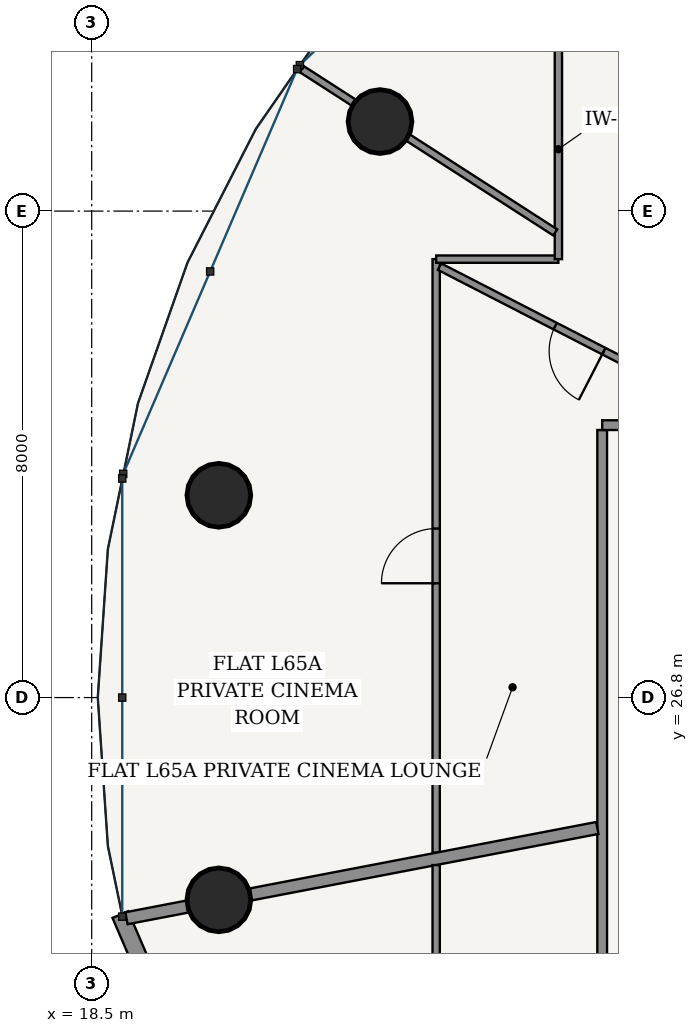
"""IFC4 building model, lengths in metres.
Left out: names, types, materials, properties, quantities, classifications, styles, units other than length and angle.
Written with IfcOpenShell. Run it as: python <this file> out.ifc"""

import sys

from ifc_helpers import new_model, si_unit, direction, frame, frame_2d, origin, origin_2d, place, context, subcontext, project, spatial, rectangle, hollow_circle, extrude, source, transform, mapped, element, fill, save


model = new_model("IFC4")
c1 = context("Model", 3, precision=1e-05, world=origin(), true_north=direction((-0.2419218956, 0.970295726276)))
c2 = subcontext(c1, "Body", "Model", "MODEL_VIEW")
j1 = project(units=[si_unit("LENGTHUNIT", "METRE"), si_unit("PLANEANGLEUNIT", "RADIAN")], contexts=[c1])
p1 = place(None, origin())
s1 = spatial("IfcSite", under=j1, at=p1, CompositionType="ELEMENT")
p2 = place(p1, origin())
s2 = spatial("IfcBuilding", under=s1, at=p2, CompositionType="ELEMENT")
p3 = place(p2, frame((0.0, 0.0, 248.2)))
s3 = spatial("IfcBuildingStorey", under=s2, at=p3, CompositionType="ELEMENT", Elevation=248.2)
for number, where, z_axis, x_axis in (
    (1, (23.241, 36.272, 0.0), (0.0, 0.0, 1.0), (1.0, 0.0, 0.0)),
    (2, (20.591, 30.126, 0.0), (0.0, 0.0, 1.0), (1.0, 0.0, 0.0)),
    (3, (20.591, 23.474, 0.0), (0.0, 0.0, 1.0), (1.0, 0.0, 0.0)),
):
    element("IfcColumn", number, at=place(p3, frame(where, z_axis=z_axis, x_axis=x_axis)), inside=s3, PredefinedType="COLUMN", context=c2, shape_type="SweptSolid", body=[
        extrude(hollow_circle(Radius=0.525, WallThickness=0.035, at=origin_2d()), origin(), (0.0, 0.0, 1.0), 3.75),
    ])
p4 = place(p3, frame((18.971, 23.231, 0.0), z_axis=(0.0, 0.0, 1.0), x_axis=(0.394816612978, -0.918759948037, 0.0)))
e4 = element("IfcWall", 4, at=p4, inside=s3, PredefinedType="SOLIDWALL", context=c2, shape_type="SweptSolid", body=[
    extrude(rectangle(XDim=7.485, YDim=0.28, at=frame_2d((3.743, 0.0))), origin(), (0.0, 0.0, 1.0), 3.49),
])
p5 = place(p4, frame((1.246, 0.0, 0.85)))
e5 = element("IfcOpeningElement", 5, at=p5, cuts=e4, PredefinedType="OPENING", context=c2, shape_type="SweptSolid", body=[
    extrude(rectangle(XDim=1.55, YDim=1.95, at=frame_2d((0.775, 0.975))), frame((0.0, 0.15, 0.0), z_axis=(0.0, -1.0, 0.0), x_axis=(1.0, 0.0, 0.0)), (0.0, 0.0, 1.0), 0.3),
])
p6 = place(p4, frame((4.689, 0.0, 0.85)))
e6 = element("IfcOpeningElement", 6, at=p6, cuts=e4, PredefinedType="OPENING", context=c2, shape_type="SweptSolid", body=[
    extrude(rectangle(XDim=1.55, YDim=1.95, at=frame_2d((0.775, 0.975))), frame((0.0, 0.15, 0.0), z_axis=(0.0, -1.0, 0.0), x_axis=(1.0, 0.0, 0.0)), (0.0, 0.0, 1.0), 0.3),
])
p7 = place(p3, frame((26.895, 17.275, 0.0), z_axis=(0.0, 0.0, 1.0), x_axis=(0.0, 1.0, 0.0)))
e7 = element("IfcWall", 7, at=p7, inside=s3, PredefinedType="PARTITIONING", context=c2, shape_type="SweptSolid", body=[
    extrude(rectangle(XDim=13.925, YDim=0.16, at=frame_2d((6.962, 0.0))), origin(), (0.0, 0.0, 1.0), 3.015),
])
p8 = place(p3, frame((26.895, 31.28, 0.0), z_axis=(0.0, 0.0, 1.0), x_axis=(1.0, 0.0, 0.0)))
e8 = element("IfcWall", 8, at=p8, inside=s3, PredefinedType="PARTITIONING", context=c2, shape_type="SweptSolid", body=[
    extrude(rectangle(XDim=1.93, YDim=0.16, at=frame_2d((0.965, 0.0))), origin(), (0.0, 0.0, 1.0), 3.49),
])
p9 = place(p3, frame((24.165, 24.249, 0.0), z_axis=(0.0, 0.0, 1.0), x_axis=(0.0, 1.0, 0.0)))
e9 = element("IfcWall", 9, at=p9, inside=s3, PredefinedType="PARTITIONING", context=c2, shape_type="SweptSolid", body=[
    extrude(rectangle(XDim=9.761, YDim=0.12, at=frame_2d((4.88, 0.0))), origin(), (0.0, 0.0, 1.0), 3.015),
])
p10 = place(p9, frame((4.43, 0.0, 0.0)))
e10 = element("IfcOpeningElement", 10, at=p10, cuts=e9, PredefinedType="OPENING", context=c2, shape_type="SweptSolid", body=[
    extrude(rectangle(XDim=0.9, YDim=2.15, at=frame_2d((0.45, 1.075))), frame((0.0, 0.07, 0.0), z_axis=(0.0, -1.0, 0.0), x_axis=(1.0, 0.0, 0.0)), (0.0, 0.0, 1.0), 0.14),
])
p11 = place(p3, frame((24.165, 34.01, 0.0), z_axis=(0.0, 0.0, 1.0), x_axis=(1.0, 0.0, 0.0)))
e11 = element("IfcWall", 11, at=p11, inside=s3, PredefinedType="PARTITIONING", context=c2, shape_type="SweptSolid", body=[
    extrude(rectangle(XDim=2.01, YDim=0.12, at=frame_2d((1.005, 0.0))), origin(), (0.0, 0.0, 1.0), 3.209),
])
p12 = place(p3, frame((26.175, 34.01, 0.0), z_axis=(0.0, 0.0, 1.0), x_axis=(0.0, 1.0, 0.0)))
e12 = element("IfcWall", 12, at=p12, inside=s3, PredefinedType="PARTITIONING", context=c2, shape_type="SweptSolid", body=[
    extrude(rectangle(XDim=3.615, YDim=0.12, at=frame_2d((1.808, 0.0))), origin(), (0.0, 0.0, 1.0), 3.015),
])
p13 = place(p3, frame((26.123, 34.45, 0.0), z_axis=(0.0, 0.0, 1.0), x_axis=(-0.840703033126, 0.541496454367, 0.0)))
e13 = element("IfcWall", 13, at=p13, inside=s3, PredefinedType="PARTITIONING", context=c2, shape_type="SweptSolid", body=[
    extrude(rectangle(XDim=4.958, YDim=0.12, at=frame_2d((2.479, 0.0))), origin(), (0.0, 0.0, 1.0), 3.015),
])
p14 = place(p3, frame((28.825, 31.518, 0.0), z_axis=(0.0, 0.0, 1.0), x_axis=(-0.889305882583, 0.457312854842, 0.0)))
e14 = element("IfcWall", 14, at=p14, inside=s3, PredefinedType="PARTITIONING", context=c2, shape_type="SweptSolid", body=[
    extrude(rectangle(XDim=5.178, YDim=0.12, at=frame_2d((2.589, 0.0))), origin(), (0.0, 0.0, 1.0), 3.209),
])
p15 = place(p14, frame((2.139, 0.0, 0.0)))
e15 = element("IfcOpeningElement", 15, at=p15, cuts=e14, PredefinedType="OPENING", context=c2, shape_type="SweptSolid", body=[
    extrude(rectangle(XDim=0.9, YDim=2.15, at=frame_2d((0.45, 1.075))), frame((0.0, 0.07, 0.0), z_axis=(0.0, -1.0, 0.0), x_axis=(1.0, 0.0, 0.0)), (0.0, 0.0, 1.0), 0.14),
])
p16 = place(p3, frame((26.815, 24.656, 0.0), z_axis=(0.0, 0.0, 1.0), x_axis=(-0.982109889803, -0.188308694305, 0.0)))
e16 = element("IfcWall", 16, at=p16, inside=s3, PredefinedType="PARTITIONING", context=c2, shape_type="SweptSolid", body=[
    extrude(rectangle(XDim=7.884, YDim=0.2, at=frame_2d((3.942, 0.0))), origin(), (0.0, 0.0, 1.0), 3.015),
])
p17 = place(p3, frame((24.165, 14.465, 0.0), z_axis=(0.0, 0.0, 1.0), x_axis=(0.0, 1.0, 0.0)))
e17 = element("IfcWall", 17, at=p17, inside=s3, PredefinedType="PARTITIONING", context=c2, shape_type="SweptSolid", body=[
    extrude(rectangle(XDim=9.58, YDim=0.12, at=frame_2d((4.79, 0.0))), origin(), (0.0, 0.0, 1.0), 3.015),
])
p18 = place(p17, frame((0.879, 0.0, 0.0)))
e18 = element("IfcOpeningElement", 18, at=p18, cuts=e17, PredefinedType="OPENING", context=c2, shape_type="SweptSolid", body=[
    extrude(rectangle(XDim=0.9, YDim=2.15, at=frame_2d((0.45, 1.075))), frame((0.0, 0.07, 0.0), z_axis=(0.0, -1.0, 0.0), x_axis=(1.0, 0.0, 0.0)), (0.0, 0.0, 1.0), 0.14),
])
m1 = source(origin(), c2, "Body", "SweptSolid", [
    extrude(rectangle(XDim=0.9, YDim=2.15, at=frame_2d((0.45, 1.075))), frame((0.0, 0.025, 0.0), z_axis=(0.0, -1.0, 0.0), x_axis=(1.0, 0.0, 0.0)), (0.0, 0.0, 1.0), 0.05),
])
p19 = place(p15, origin())
e19 = element("IfcDoor", 19, at=p19, inside=s3, OperationType="SINGLE_SWING_LEFT", PredefinedType="DOOR", context=c2, shape_type="MappedRepresentation", body=[
    mapped(m1, transform((0.0, 0.0, 0.0), scale=1.0)),
])
fill(e15, e19)
p20 = place(p10, origin())
e20 = element("IfcDoor", 20, at=p20, inside=s3, OperationType="SINGLE_SWING_LEFT", PredefinedType="DOOR", context=c2, shape_type="MappedRepresentation", body=[
    mapped(m1, transform((0.0, 0.0, 0.0), scale=1.0)),
])
fill(e10, e20)
save(model, sys.argv[1])
